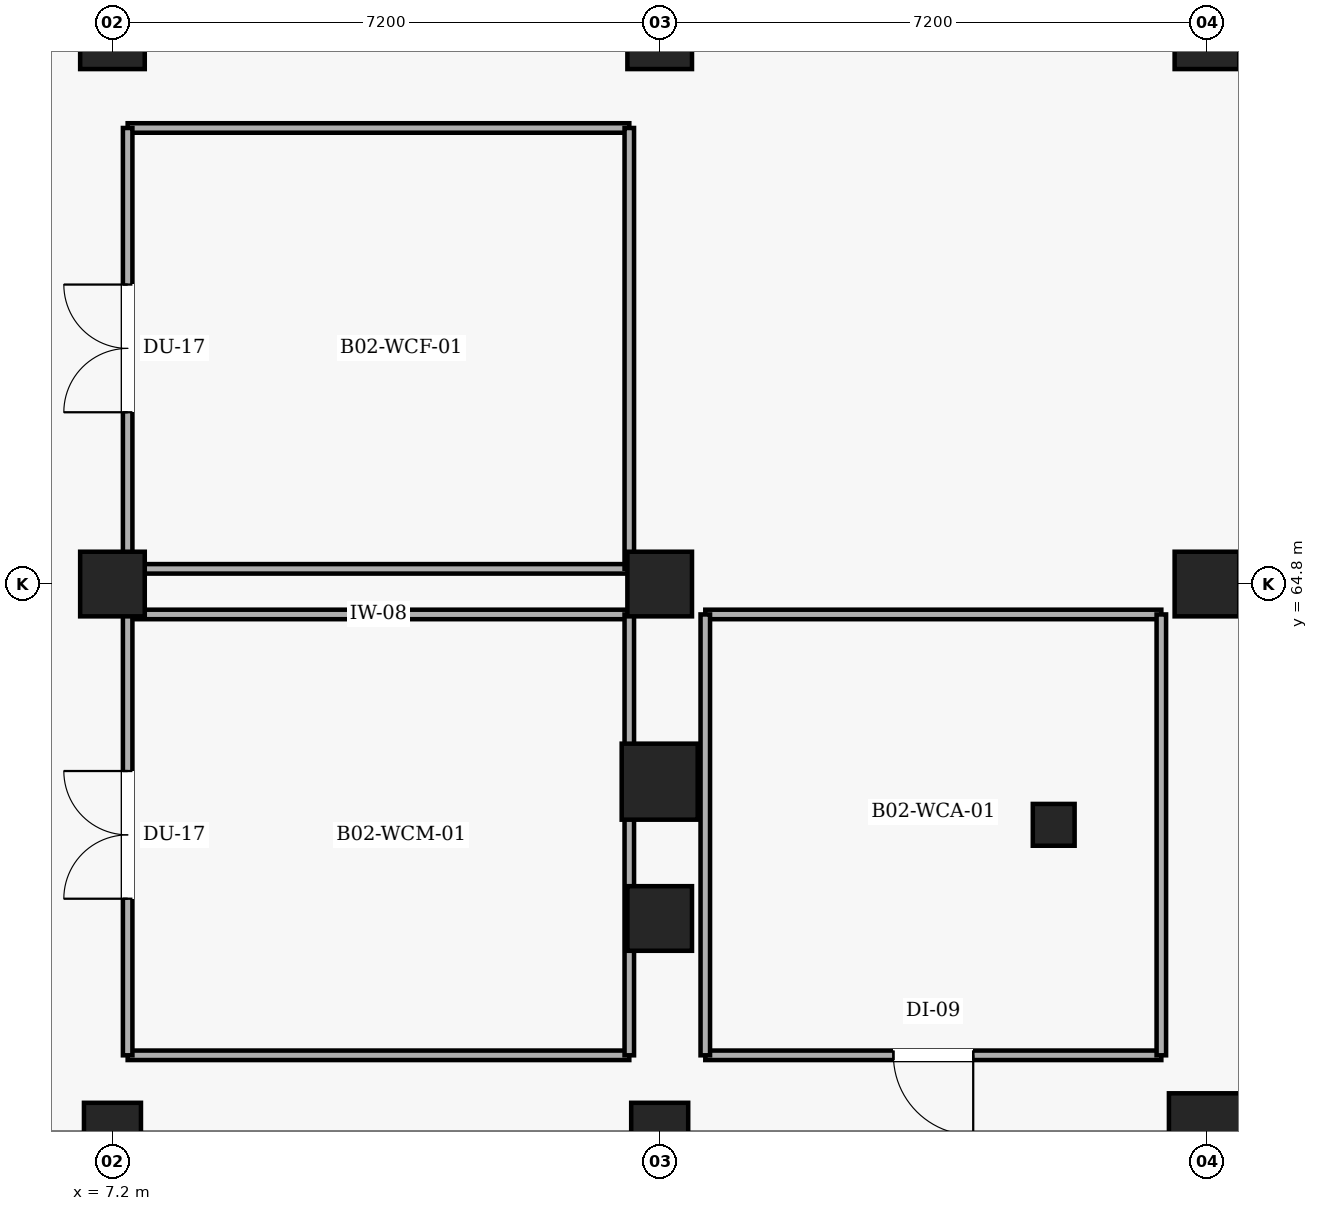
"""IFC4 building model, lengths in metres.
Left out: names, types, materials, properties, quantities, classifications, styles, units other than length and angle.
Written with IfcOpenShell. Run it as: python <this file> out.ifc"""

import sys

from ifc_helpers import new_model, si_unit, direction, frame, frame_2d, origin, origin_2d, place, context, subcontext, project, spatial, rectangle, extrude, element, fill, save


model = new_model("IFC4")
c1 = context("Model", 3, precision=1e-05, world=origin(), true_north=direction((0.0, 1.0)))
c2 = subcontext(c1, "Body", "Model", "MODEL_VIEW")
j1 = project(units=[si_unit("LENGTHUNIT", "METRE"), si_unit("PLANEANGLEUNIT", "RADIAN")], contexts=[c1])
p1 = place(None, origin())
s1 = spatial("IfcSite", under=j1, at=p1, CompositionType="ELEMENT")
p2 = place(p1, origin())
s2 = spatial("IfcBuilding", under=s1, at=p2, CompositionType="ELEMENT")
p3 = place(p2, frame((0.0, 0.0, -10.8)))
s3 = spatial("IfcBuildingStorey", under=s2, at=p3, CompositionType="ELEMENT", Elevation=-10.8)
p4 = place(p3, frame((7.2, 57.6, 0.0), z_axis=(0.0, 0.0, 1.0), x_axis=(1.0, 0.0, 0.0)))
e1 = element("IfcColumn", 1, at=p4, inside=s3, PredefinedType="COLUMN", context=c2, shape_type="SweptSolid", body=[
    extrude(rectangle(XDim=0.75, YDim=0.75, at=origin_2d()), origin(), (0.0, 0.0, 1.0), 5.0),
])
for number, where, z_axis, x_axis in (
    (2, (7.2, 64.8, 0.0), (0.0, 0.0, 1.0), (1.0, 0.0, 0.0)),
    (3, (7.2, 72.0, 0.0), (0.0, 0.0, 1.0), (1.0, 0.0, 0.0)),
):
    element("IfcColumn", number, at=place(p3, frame(where, z_axis=z_axis, x_axis=x_axis)), inside=s3, PredefinedType="COLUMN", context=c2, shape_type="SweptSolid", body=[
        extrude(rectangle(XDim=0.85, YDim=0.85, at=origin_2d()), origin(), (0.0, 0.0, 1.0), 5.0),
    ])
p5 = place(p3, frame((14.4, 57.6, 0.0), z_axis=(0.0, 0.0, 1.0), x_axis=(1.0, 0.0, 0.0)))
e4 = element("IfcColumn", 4, at=p5, inside=s3, PredefinedType="COLUMN", context=c2, shape_type="SweptSolid", body=[
    extrude(rectangle(XDim=0.75, YDim=0.75, at=origin_2d()), origin(), (0.0, 0.0, 1.0), 5.0),
])
p6 = place(p3, frame((14.4, 60.4, 0.0), z_axis=(0.0, 0.0, 1.0), x_axis=(1.0, 0.0, 0.0)))
e5 = element("IfcColumn", 5, at=p6, inside=s3, PredefinedType="COLUMN", context=c2, shape_type="SweptSolid", body=[
    extrude(rectangle(XDim=0.85, YDim=0.85, at=origin_2d()), origin(), (0.0, 0.0, 1.0), 5.0),
])
p7 = place(p3, frame((14.4, 62.2, 0.0), z_axis=(0.0, 0.0, 1.0), x_axis=(1.0, 0.0, 0.0)))
e6 = element("IfcColumn", 6, at=p7, inside=s3, PredefinedType="COLUMN", context=c2, shape_type="SweptSolid", body=[
    extrude(rectangle(XDim=1.0, YDim=1.0, at=origin_2d()), origin(), (0.0, 0.0, 1.0), 5.0),
])
for number, where, z_axis, x_axis in (
    (7, (14.4, 64.8, 0.0), (0.0, 0.0, 1.0), (1.0, 0.0, 0.0)),
    (8, (14.4, 72.0, 0.0), (0.0, 0.0, 1.0), (1.0, 0.0, 0.0)),
):
    element("IfcColumn", number, at=place(p3, frame(where, z_axis=z_axis, x_axis=x_axis)), inside=s3, PredefinedType="COLUMN", context=c2, shape_type="SweptSolid", body=[
        extrude(rectangle(XDim=0.85, YDim=0.85, at=origin_2d()), origin(), (0.0, 0.0, 1.0), 5.0),
    ])
p8 = place(p3, frame((21.6, 57.6, 0.0), z_axis=(0.0, 0.0, 1.0), x_axis=(1.0, 0.0, 0.0)))
e9 = element("IfcColumn", 9, at=p8, inside=s3, PredefinedType="COLUMN", context=c2, shape_type="SweptSolid", body=[
    extrude(rectangle(XDim=1.0, YDim=1.0, at=origin_2d()), origin(), (0.0, 0.0, 1.0), 5.0),
])
for number, where, z_axis, x_axis in (
    (10, (21.6, 64.8, 0.0), (0.0, 0.0, 1.0), (1.0, 0.0, 0.0)),
    (11, (21.6, 72.0, 0.0), (0.0, 0.0, 1.0), (1.0, 0.0, 0.0)),
):
    element("IfcColumn", number, at=place(p3, frame(where, z_axis=z_axis, x_axis=x_axis)), inside=s3, PredefinedType="COLUMN", context=c2, shape_type="SweptSolid", body=[
        extrude(rectangle(XDim=0.85, YDim=0.85, at=origin_2d()), origin(), (0.0, 0.0, 1.0), 5.0),
    ])
p9 = place(p3, frame((19.584, 61.632, 0.0), z_axis=(0.0, 0.0, 1.0), x_axis=(1.0, 0.0, 0.0)))
e12 = element("IfcColumn", 12, at=p9, inside=s3, PredefinedType="COLUMN", context=c2, shape_type="SweptSolid", body=[
    extrude(rectangle(XDim=0.55, YDim=0.55, at=origin_2d()), origin(), (0.0, 0.0, 1.0), 5.0),
])
p10 = place(p3, frame((7.4, 64.4, 0.0), z_axis=(0.0, 0.0, 1.0), x_axis=(1.0, 0.0, 0.0)))
e13 = element("IfcWall", 13, at=p10, inside=s3, PredefinedType="PARTITIONING", context=c2, shape_type="SweptSolid", body=[
    extrude(rectangle(XDim=6.6, YDim=0.125, at=frame_2d((3.3, 0.0))), origin(), (0.0, 0.0, 1.0), 4.12),
])
p11 = place(p3, frame((14.0, 58.6, 0.0), z_axis=(0.0, 0.0, 1.0), x_axis=(-1.0, 0.0, 0.0)))
e14 = element("IfcWall", 14, at=p11, inside=s3, PredefinedType="PARTITIONING", context=c2, shape_type="SweptSolid", body=[
    extrude(rectangle(XDim=6.6, YDim=0.125, at=frame_2d((3.3, 0.0))), origin(), (0.0, 0.0, 1.0), 5.05),
])
p12 = place(p3, frame((14.0, 64.4, 0.0), z_axis=(0.0, 0.0, 1.0), x_axis=(0.0, -1.0, 0.0)))
e15 = element("IfcWall", 15, at=p12, inside=s3, PredefinedType="PARTITIONING", context=c2, shape_type="SweptSolid", body=[
    extrude(rectangle(XDim=5.8, YDim=0.125, at=frame_2d((2.9, 0.0))), origin(), (0.0, 0.0, 1.0), 4.22),
])
p13 = place(p3, frame((7.4, 58.6, 0.0), z_axis=(0.0, 0.0, 1.0), x_axis=(0.0, 1.0, 0.0)))
e16 = element("IfcWall", 16, at=p13, inside=s3, PredefinedType="PARTITIONING", context=c2, shape_type="SweptSolid", body=[
    extrude(rectangle(XDim=5.8, YDim=0.125, at=frame_2d((2.9, 0.0))), origin(), (0.0, 0.0, 1.0), 4.22),
])
p14 = place(p13, frame((2.06, 0.0, 0.0)))
e17 = element("IfcOpeningElement", 17, at=p14, cuts=e16, PredefinedType="OPENING", context=c2, shape_type="SweptSolid", body=[
    extrude(rectangle(XDim=1.68, YDim=2.28, at=frame_2d((0.84, 1.14))), frame((0.0, 0.073, 0.0), z_axis=(0.0, -1.0, 0.0), x_axis=(1.0, 0.0, 0.0)), (0.0, 0.0, 1.0), 0.145),
])
p15 = place(p3, frame((7.4, 70.8, 0.0), z_axis=(0.0, 0.0, 1.0), x_axis=(1.0, 0.0, 0.0)))
e18 = element("IfcWall", 18, at=p15, inside=s3, PredefinedType="PARTITIONING", context=c2, shape_type="SweptSolid", body=[
    extrude(rectangle(XDim=6.6, YDim=0.125, at=frame_2d((3.3, 0.0))), origin(), (0.0, 0.0, 1.0), 5.05),
])
p16 = place(p3, frame((14.0, 65.0, 0.0), z_axis=(0.0, 0.0, 1.0), x_axis=(-1.0, 0.0, 0.0)))
e19 = element("IfcWall", 19, at=p16, inside=s3, PredefinedType="PARTITIONING", context=c2, shape_type="SweptSolid", body=[
    extrude(rectangle(XDim=6.6, YDim=0.125, at=frame_2d((3.3, 0.0))), origin(), (0.0, 0.0, 1.0), 4.12),
])
p17 = place(p3, frame((14.0, 70.8, 0.0), z_axis=(0.0, 0.0, 1.0), x_axis=(0.0, -1.0, 0.0)))
e20 = element("IfcWall", 20, at=p17, inside=s3, PredefinedType="PARTITIONING", context=c2, shape_type="SweptSolid", body=[
    extrude(rectangle(XDim=5.8, YDim=0.125, at=frame_2d((2.9, 0.0))), origin(), (0.0, 0.0, 1.0), 4.22),
])
p18 = place(p3, frame((7.4, 65.0, 0.0), z_axis=(0.0, 0.0, 1.0), x_axis=(0.0, 1.0, 0.0)))
e21 = element("IfcWall", 21, at=p18, inside=s3, PredefinedType="PARTITIONING", context=c2, shape_type="SweptSolid", body=[
    extrude(rectangle(XDim=5.8, YDim=0.125, at=frame_2d((2.9, 0.0))), origin(), (0.0, 0.0, 1.0), 4.22),
])
p19 = place(p18, frame((2.06, 0.0, 0.0)))
e22 = element("IfcOpeningElement", 22, at=p19, cuts=e21, PredefinedType="OPENING", context=c2, shape_type="SweptSolid", body=[
    extrude(rectangle(XDim=1.68, YDim=2.28, at=frame_2d((0.84, 1.14))), frame((0.0, 0.073, 0.0), z_axis=(0.0, -1.0, 0.0), x_axis=(1.0, 0.0, 0.0)), (0.0, 0.0, 1.0), 0.145),
])
p20 = place(p3, frame((15.0, 64.4, 0.0), z_axis=(0.0, 0.0, 1.0), x_axis=(1.0, 0.0, 0.0)))
e23 = element("IfcWall", 23, at=p20, inside=s3, PredefinedType="PARTITIONING", context=c2, shape_type="SweptSolid", body=[
    extrude(rectangle(XDim=6.0, YDim=0.125, at=frame_2d((3.0, 0.0))), origin(), (0.0, 0.0, 1.0), 4.12),
])
p21 = place(p3, frame((21.0, 58.6, 0.0), z_axis=(0.0, 0.0, 1.0), x_axis=(-1.0, 0.0, 0.0)))
e24 = element("IfcWall", 24, at=p21, inside=s3, PredefinedType="PARTITIONING", context=c2, shape_type="SweptSolid", body=[
    extrude(rectangle(XDim=6.0, YDim=0.125, at=frame_2d((3.0, 0.0))), origin(), (0.0, 0.0, 1.0), 5.05),
])
p22 = place(p21, frame((2.475, 0.0, 0.0)))
e25 = element("IfcOpeningElement", 25, at=p22, cuts=e24, PredefinedType="OPENING", context=c2, shape_type="SweptSolid", body=[
    extrude(rectangle(XDim=1.05, YDim=2.1, at=frame_2d((0.525, 1.05))), frame((0.0, 0.073, 0.0), z_axis=(0.0, -1.0, 0.0), x_axis=(1.0, 0.0, 0.0)), (0.0, 0.0, 1.0), 0.145),
])
for number, where, z_axis, x_axis in (
    (26, (21.0, 64.4, 0.0), (0.0, 0.0, 1.0), (0.0, -1.0, 0.0)),
    (27, (15.0, 58.6, 0.0), (0.0, 0.0, 1.0), (0.0, 1.0, 0.0)),
):
    element("IfcWall", number, at=place(p3, frame(where, z_axis=z_axis, x_axis=x_axis)), inside=s3, PredefinedType="PARTITIONING", context=c2, shape_type="SweptSolid", body=[
        extrude(rectangle(XDim=5.8, YDim=0.125, at=frame_2d((2.9, 0.0))), origin(), (0.0, 0.0, 1.0), 5.05),
    ])
p23 = place(p14, origin())
e28 = element("IfcDoor", 28, at=p23, inside=s3, OperationType="DOUBLE_DOOR_SINGLE_SWING", PredefinedType="DOOR", context=c2, shape_type="SweptSolid", body=[
    extrude(rectangle(XDim=1.68, YDim=2.28, at=frame_2d((0.84, 1.14))), frame((0.0, 0.025, 0.0), z_axis=(0.0, -1.0, 0.0), x_axis=(1.0, 0.0, 0.0)), (0.0, 0.0, 1.0), 0.05),
])
fill(e17, e28)
p24 = place(p19, origin())
e29 = element("IfcDoor", 29, at=p24, inside=s3, OperationType="DOUBLE_DOOR_SINGLE_SWING", PredefinedType="DOOR", context=c2, shape_type="SweptSolid", body=[
    extrude(rectangle(XDim=1.68, YDim=2.28, at=frame_2d((0.84, 1.14))), frame((0.0, 0.025, 0.0), z_axis=(0.0, -1.0, 0.0), x_axis=(1.0, 0.0, 0.0)), (0.0, 0.0, 1.0), 0.05),
])
fill(e22, e29)
p25 = place(p22, origin())
e30 = element("IfcDoor", 30, at=p25, inside=s3, OperationType="SINGLE_SWING_LEFT", PredefinedType="DOOR", context=c2, shape_type="SweptSolid", body=[
    extrude(rectangle(XDim=1.05, YDim=2.1, at=frame_2d((0.525, 1.05))), frame((0.0, 0.025, 0.0), z_axis=(0.0, -1.0, 0.0), x_axis=(1.0, 0.0, 0.0)), (0.0, 0.0, 1.0), 0.05),
])
fill(e25, e30)
save(model, sys.argv[1])
